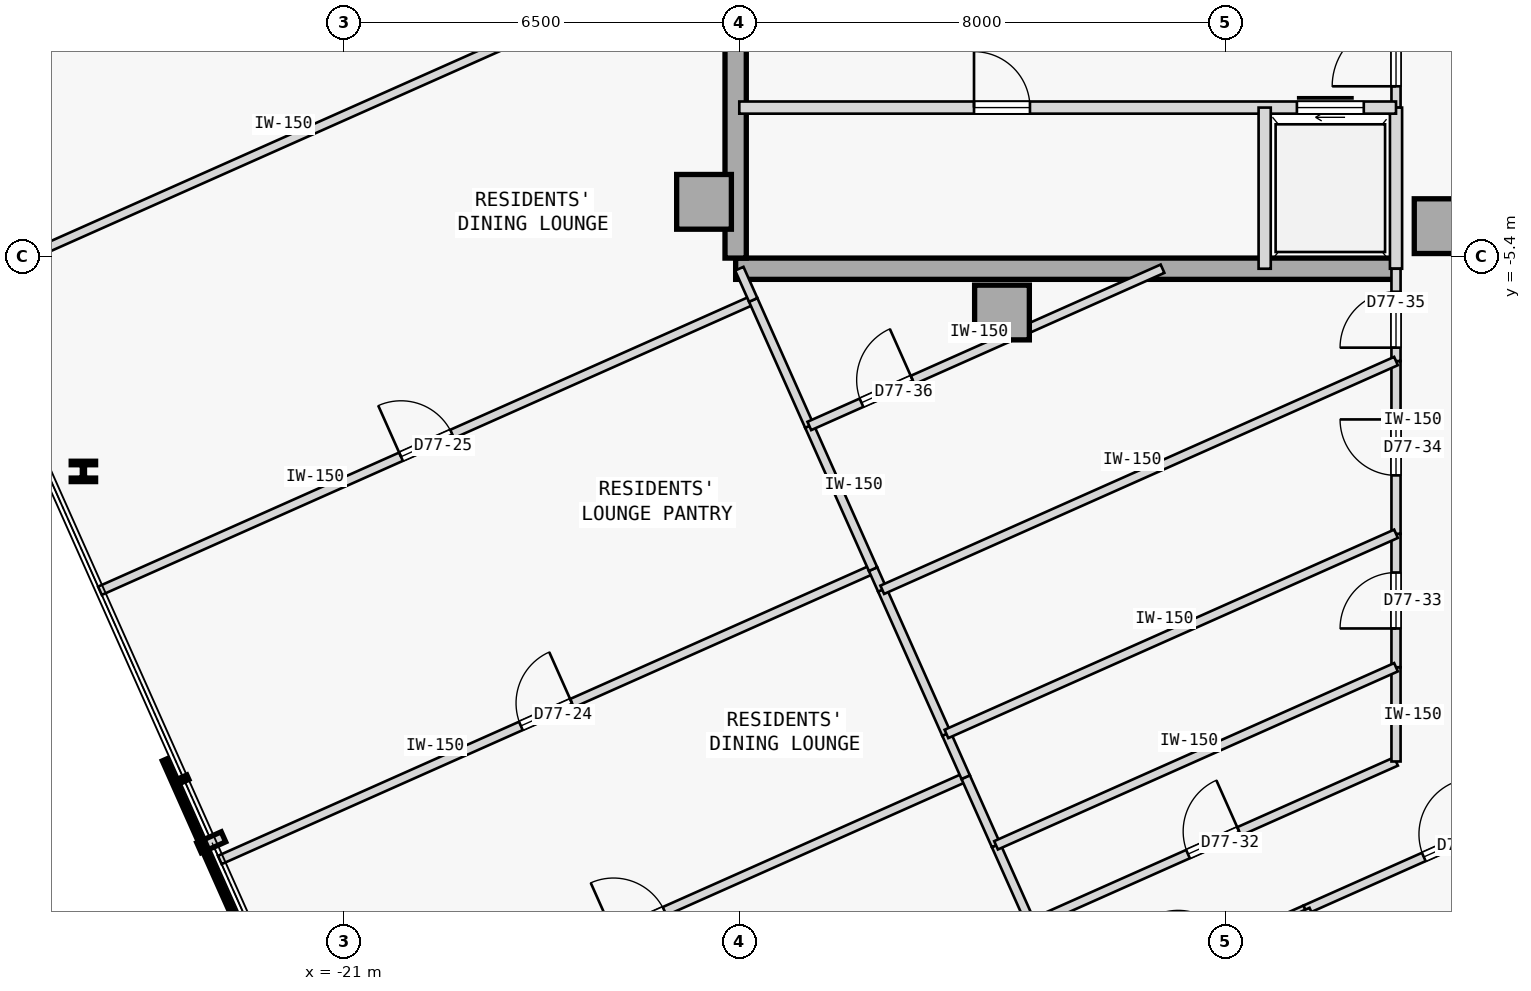
"""IFC4 building model, lengths in metres.
Left out: names, types, materials, properties, quantities, classifications, styles, units other than length and angle.
Written with IfcOpenShell. Run it as: python <this file> out.ifc"""

import sys

from ifc_helpers import new_model, si_unit, direction, frame, frame_2d, origin, origin_2d, place, context, subcontext, project, spatial, rectangle, i_section, extrude, element, fill, save


model = new_model("IFC4")
c1 = context("Model", 3, precision=1e-05, world=origin(), true_north=direction((0.0, 1.0)))
c2 = subcontext(c1, "Body", "Model", "MODEL_VIEW")
j1 = project(units=[si_unit("LENGTHUNIT", "METRE"), si_unit("PLANEANGLEUNIT", "RADIAN")], contexts=[c1])
p1 = place(None, origin())
s1 = spatial("IfcSite", under=j1, at=p1, CompositionType="ELEMENT")
p2 = place(p1, origin())
s2 = spatial("IfcBuilding", under=s1, at=p2, CompositionType="ELEMENT")
p3 = place(p2, frame((0.0, 0.0, 288.6)))
s3 = spatial("IfcBuildingStorey", under=s2, at=p3, CompositionType="ELEMENT", Elevation=288.6)
for number, where, z_axis, x_axis in (
    (1, (-15.08, -4.5, 0.0), (0.0, 0.0, 1.0), (1.0, 0.0, 0.0)),
    (2, (-10.18, -6.32, 0.0), (0.0, 0.0, 1.0), (1.0, 0.0, 0.0)),
    (3, (-2.95, -4.9, 0.0), (0.0, 0.0, 1.0), (1.0, 0.0, 0.0)),
):
    element("IfcColumn", number, at=place(p3, frame(where, z_axis=z_axis, x_axis=x_axis)), inside=s3, PredefinedType="COLUMN", context=c2, shape_type="SweptSolid", body=[
        extrude(rectangle(XDim=0.9, YDim=0.9, at=origin_2d()), origin(), (0.0, 0.0, 1.0), 3.35),
    ])
p4 = place(p3, frame((-14.56, -5.6, 0.0), z_axis=(0.0, 0.0, 1.0), x_axis=(1.0, 0.0, 0.0)))
e4 = element("IfcWall", 4, at=p4, inside=s3, PredefinedType="SHEAR", context=c2, shape_type="SweptSolid", body=[
    extrude(rectangle(XDim=10.86, YDim=0.35, at=frame_2d((5.43, 0.0))), origin(), (0.0, 0.0, 1.0), 3.125),
])
p5 = place(p3, frame((-14.56, -5.425, 0.0), z_axis=(0.0, 0.0, 1.0), x_axis=(0.0, 1.0, 0.0)))
e5 = element("IfcWall", 5, at=p5, inside=s3, PredefinedType="SHEAR", context=c2, shape_type="SweptSolid", body=[
    extrude(rectangle(XDim=10.85, YDim=0.35, at=frame_2d((5.425, 0.0))), origin(), (0.0, 0.0, 1.0), 3.125),
])
p6 = place(p3, frame((-25.286, -8.933, 0.0), z_axis=(0.0, 0.0, 1.0), x_axis=(1.0, 0.0, 0.0)))
e6 = element("IfcColumn", 6, at=p6, inside=s3, PredefinedType="COLUMN", context=c2, shape_type="SweptSolid", body=[
    extrude(i_section(OverallWidth=0.401, OverallDepth=0.335, WebThickness=0.036, FlangeThickness=0.058, FilletRadius=0.015, at=origin_2d()), origin(), (0.0, 0.0, 1.0), 3.35),
])
p7 = place(p3, frame((-3.7, -2.95, 0.0), z_axis=(0.0, 0.0, 1.0), x_axis=(0.0, 1.0, 0.0)))
e7 = element("IfcWall", 7, at=p7, inside=s3, PredefinedType="PARTITIONING", context=c2, shape_type="SweptSolid", body=[
    extrude(rectangle(XDim=1.8, YDim=0.15, at=frame_2d((0.9, 0.0))), origin(), (0.0, 0.0, 1.0), 3.125),
])
p8 = place(p7, frame((0.35, 0.0, 0.0)))
e8 = element("IfcOpeningElement", 8, at=p8, cuts=e7, PredefinedType="OPENING", context=c2, shape_type="SweptSolid", body=[
    extrude(rectangle(XDim=1.05, YDim=2.18, at=frame_2d((0.525, 1.09))), frame((0.0, 0.085, 0.0), z_axis=(0.0, -1.0, 0.0), x_axis=(1.0, 0.0, 0.0)), (0.0, 0.0, 1.0), 0.17),
])
p9 = place(p3, frame((-3.7, -5.6, 0.0), z_axis=(0.0, 0.0, 1.0), x_axis=(0.0, 1.0, 0.0)))
e9 = element("IfcWall", 9, at=p9, inside=s3, PredefinedType="STANDARD", context=c2, shape_type="SweptSolid", body=[
    extrude(rectangle(XDim=2.65, YDim=0.2, at=frame_2d((1.325, 0.0))), origin(), (0.0, 0.0, 1.0), 3.125),
])
p10 = place(p3, frame((-14.5, -2.95, 0.0), z_axis=(0.0, 0.0, 1.0), x_axis=(1.0, 0.0, 0.0)))
e10 = element("IfcWall", 10, at=p10, inside=s3, PredefinedType="STANDARD", context=c2, shape_type="SweptSolid", body=[
    extrude(rectangle(XDim=10.8, YDim=0.2, at=frame_2d((5.4, 0.0))), origin(), (0.0, 0.0, 1.0), 3.125),
])
p11 = place(p10, frame((9.17, 0.0, 0.0)))
e11 = element("IfcOpeningElement", 11, at=p11, cuts=e10, PredefinedType="OPENING", context=c2, shape_type="SweptSolid", body=[
    extrude(rectangle(XDim=1.1, YDim=2.15, at=frame_2d((0.55, 1.075))), frame((0.0, 0.11, 0.0), z_axis=(0.0, -1.0, 0.0), x_axis=(1.0, 0.0, 0.0)), (0.0, 0.0, 1.0), 0.22),
])
p12 = place(p10, frame((3.86, 0.0, 0.0)))
e12 = element("IfcOpeningElement", 12, at=p12, cuts=e10, PredefinedType="OPENING", context=c2, shape_type="SweptSolid", body=[
    extrude(rectangle(XDim=0.92, YDim=2.15, at=frame_2d((0.46, 1.075))), frame((0.0, 0.11, 0.0), z_axis=(0.0, -1.0, 0.0), x_axis=(1.0, 0.0, 0.0)), (0.0, 0.0, 1.0), 0.22),
])
p13 = place(p3, frame((-5.86, -5.6, 0.0), z_axis=(0.0, 0.0, 1.0), x_axis=(0.0, 1.0, 0.0)))
e13 = element("IfcWall", 13, at=p13, inside=s3, PredefinedType="STANDARD", context=c2, shape_type="SweptSolid", body=[
    extrude(rectangle(XDim=2.65, YDim=0.2, at=frame_2d((1.325, 0.0))), origin(), (0.0, 0.0, 1.0), 3.125),
])
p14 = place(p3, frame((-8.533, -17.628, 0.0), z_axis=(0.0, 0.0, 1.0), x_axis=(0.913560976273, 0.406701785873, 0.0)))
e14 = element("IfcWall", 14, at=p14, inside=s3, PredefinedType="PARTITIONING", context=c2, shape_type="SweptSolid", body=[
    extrude(rectangle(XDim=3.659, YDim=0.15, at=frame_2d((1.829, 0.0))), origin(), (0.0, 0.0, 1.0), 3.125),
])
p15 = place(p14, frame((1.369, 0.0, 0.0)))
e15 = element("IfcOpeningElement", 15, at=p15, cuts=e14, PredefinedType="OPENING", context=c2, shape_type="SweptSolid", body=[
    extrude(rectangle(XDim=0.92, YDim=2.15, at=frame_2d((0.46, 1.075))), frame((0.0, 0.085, 0.0), z_axis=(0.0, -1.0, 0.0), x_axis=(1.0, 0.0, 0.0)), (0.0, 0.0, 1.0), 0.17),
])
p16 = place(p3, frame((-5.191, -16.14, 0.0), z_axis=(0.0, 0.0, 1.0), x_axis=(0.913541346619, 0.40674587646, 0.0)))
e16 = element("IfcWall", 16, at=p16, inside=s3, PredefinedType="PARTITIONING", context=c2, shape_type="SweptSolid", body=[
    extrude(rectangle(XDim=5.183, YDim=0.15, at=frame_2d((2.591, 0.0))), origin(), (0.0, 0.0, 1.0), 3.125),
])
p17 = place(p16, frame((2.132, 0.0, 0.0)))
e17 = element("IfcOpeningElement", 17, at=p17, cuts=e16, PredefinedType="OPENING", context=c2, shape_type="SweptSolid", body=[
    extrude(rectangle(XDim=0.92, YDim=2.15, at=frame_2d((0.46, 1.075))), frame((0.0, 0.085, 0.0), z_axis=(0.0, -1.0, 0.0), x_axis=(1.0, 0.0, 0.0)), (0.0, 0.0, 1.0), 0.17),
])
p18 = place(p3, frame((-9.702, -16.375, 0.0), z_axis=(0.0, 0.0, 1.0), x_axis=(0.913552389019, 0.406721074594, 0.0)))
e18 = element("IfcWall", 18, at=p18, inside=s3, PredefinedType="PARTITIONING", context=c2, shape_type="SweptSolid", body=[
    extrude(rectangle(XDim=6.57, YDim=0.15, at=frame_2d((3.285, 0.0))), origin(), (0.0, 0.0, 1.0), 3.125),
])
p19 = place(p18, frame((2.825, 0.0, 0.0)))
e19 = element("IfcOpeningElement", 19, at=p19, cuts=e18, PredefinedType="OPENING", context=c2, shape_type="SweptSolid", body=[
    extrude(rectangle(XDim=0.92, YDim=2.15, at=frame_2d((0.46, 1.075))), frame((0.0, 0.085, 0.0), z_axis=(0.0, -1.0, 0.0), x_axis=(1.0, 0.0, 0.0)), (0.0, 0.0, 1.0), 0.17),
])
p20 = place(p3, frame((-3.7, -13.703, 0.0), z_axis=(0.0, 0.0, 1.0), x_axis=(-0.000157529929, 0.999999987592, 0.0)))
e20 = element("IfcWall", 20, at=p20, inside=s3, PredefinedType="PARTITIONING", context=c2, shape_type="SweptSolid", body=[
    extrude(rectangle(XDim=1.55, YDim=0.15, at=frame_2d((0.775, 0.0))), origin(), (0.0, 0.0, 1.0), 3.125),
])
p21 = place(p3, frame((-3.7, -12.154, 0.0), z_axis=(0.0, 0.0, 1.0), x_axis=(0.000111222333, 0.999999993815, 0.0)))
e21 = element("IfcWall", 21, at=p21, inside=s3, PredefinedType="PARTITIONING", context=c2, shape_type="SweptSolid", body=[
    extrude(rectangle(XDim=2.195, YDim=0.15, at=frame_2d((1.098, 0.0))), origin(), (0.0, 0.0, 1.0), 3.125),
])
p22 = place(p21, frame((0.637, 0.0, 0.0)))
e22 = element("IfcOpeningElement", 22, at=p22, cuts=e21, PredefinedType="OPENING", context=c2, shape_type="SweptSolid", body=[
    extrude(rectangle(XDim=0.92, YDim=2.15, at=frame_2d((0.46, 1.075))), frame((0.0, 0.085, 0.0), z_axis=(0.0, -1.0, 0.0), x_axis=(1.0, 0.0, 0.0)), (0.0, 0.0, 1.0), 0.17),
])
p23 = place(p3, frame((-3.7, -9.958, 0.0), z_axis=(0.0, 0.0, 1.0), x_axis=(-0.000171909917, 0.999999985223, 0.0)))
e23 = element("IfcWall", 23, at=p23, inside=s3, PredefinedType="PARTITIONING", context=c2, shape_type="SweptSolid", body=[
    extrude(rectangle(XDim=2.84, YDim=0.15, at=frame_2d((1.42, 0.0))), origin(), (0.0, 0.0, 1.0), 3.125),
])
p24 = place(p23, frame((0.96, 0.0, 0.0)))
e24 = element("IfcOpeningElement", 24, at=p24, cuts=e23, PredefinedType="OPENING", context=c2, shape_type="SweptSolid", body=[
    extrude(rectangle(XDim=0.92, YDim=2.15, at=frame_2d((0.46, 1.075))), frame((0.0, 0.085, 0.0), z_axis=(0.0, -1.0, 0.0), x_axis=(1.0, 0.0, 0.0)), (0.0, 0.0, 1.0), 0.17),
])
p25 = place(p3, frame((-3.7, -7.118, 0.0), z_axis=(0.0, 0.0, 1.0), x_axis=(0.000321543392, 0.999999948305, 0.0)))
e25 = element("IfcWall", 25, at=p25, inside=s3, PredefinedType="PARTITIONING", context=c2, shape_type="SweptSolid", body=[
    extrude(rectangle(XDim=1.519, YDim=0.15, at=frame_2d((0.759, 0.0))), origin(), (0.0, 0.0, 1.0), 3.125),
])
p26 = place(p25, frame((0.22, 0.0, 0.0)))
e26 = element("IfcOpeningElement", 26, at=p26, cuts=e25, PredefinedType="OPENING", context=c2, shape_type="SweptSolid", body=[
    extrude(rectangle(XDim=0.92, YDim=2.15, at=frame_2d((0.46, 1.075))), frame((0.0, 0.085, 0.0), z_axis=(0.0, -1.0, 0.0), x_axis=(1.0, 0.0, 0.0)), (0.0, 0.0, 1.0), 0.17),
])
p27 = place(p3, frame((-21.52, -18.744, 0.0), z_axis=(0.0, 0.0, 1.0), x_axis=(0.913539967617, 0.406748973651, 0.0)))
e27 = element("IfcWall", 27, at=p27, inside=s3, PredefinedType="PARTITIONING", context=c2, shape_type="SweptSolid", body=[
    extrude(rectangle(XDim=11.76, YDim=0.15, at=frame_2d((5.88, 0.0))), origin(), (0.0, 0.0, 1.0), 3.125),
])
p28 = place(p27, frame((5.42, 0.0, 0.0)))
e28 = element("IfcOpeningElement", 28, at=p28, cuts=e27, PredefinedType="OPENING", context=c2, shape_type="SweptSolid", body=[
    extrude(rectangle(XDim=0.92, YDim=2.15, at=frame_2d((0.46, 1.075))), frame((0.0, 0.085, 0.0), z_axis=(0.0, -1.0, 0.0), x_axis=(1.0, 0.0, 0.0)), (0.0, 0.0, 1.0), 0.17),
])
p29 = place(p3, frame((-9.702, -16.375, 0.0), z_axis=(0.0, 0.0, 1.0), x_axis=(-0.406762319034, 0.913534025537, 0.0)))
e29 = element("IfcWall", 29, at=p29, inside=s3, PredefinedType="PARTITIONING", context=c2, shape_type="SweptSolid", body=[
    extrude(rectangle(XDim=1.416, YDim=0.15, at=frame_2d((0.708, 0.0))), origin(), (0.0, 0.0, 1.0), 3.125),
])
p30 = place(p3, frame((-10.278, -15.082, 0.0), z_axis=(0.0, 0.0, 1.0), x_axis=(-0.406655262741, 0.913581686159, 0.0)))
e30 = element("IfcWall", 30, at=p30, inside=s3, PredefinedType="PARTITIONING", context=c2, shape_type="SweptSolid", body=[
    extrude(rectangle(XDim=1.227, YDim=0.15, at=frame_2d((0.614, 0.0))), origin(), (0.0, 0.0, 1.0), 3.125),
])
p31 = place(p3, frame((-23.043, -15.323, 0.0), z_axis=(0.0, 0.0, 1.0), x_axis=(0.913547681516, 0.406731648137, 0.0)))
e31 = element("IfcWall", 31, at=p31, inside=s3, PredefinedType="PARTITIONING", context=c2, shape_type="SweptSolid", body=[
    extrude(rectangle(XDim=11.76, YDim=0.15, at=frame_2d((5.88, 0.0))), origin(), (0.0, 0.0, 1.0), 3.125),
])
p32 = place(p31, frame((5.42, 0.0, 0.0)))
e32 = element("IfcOpeningElement", 32, at=p32, cuts=e31, PredefinedType="OPENING", context=c2, shape_type="SweptSolid", body=[
    extrude(rectangle(XDim=0.92, YDim=2.15, at=frame_2d((0.46, 1.075))), frame((0.0, 0.085, 0.0), z_axis=(0.0, -1.0, 0.0), x_axis=(1.0, 0.0, 0.0)), (0.0, 0.0, 1.0), 0.17),
])
p33 = place(p3, frame((-10.777, -13.961, 0.0), z_axis=(0.0, 0.0, 1.0), x_axis=(-0.406720744325, 0.913552536057, 0.0)))
e33 = element("IfcWall", 33, at=p33, inside=s3, PredefinedType="PARTITIONING", context=c2, shape_type="SweptSolid", body=[
    extrude(rectangle(XDim=0.778, YDim=0.15, at=frame_2d((0.389, 0.0))), origin(), (0.0, 0.0, 1.0), 3.125),
])
p34 = place(p3, frame((-11.093, -13.25, 0.0), z_axis=(0.0, 0.0, 1.0), x_axis=(-0.406723252866, 0.91355141923, 0.0)))
e34 = element("IfcWall", 34, at=p34, inside=s3, PredefinedType="PARTITIONING", context=c2, shape_type="SweptSolid", body=[
    extrude(rectangle(XDim=2.595, YDim=0.15, at=frame_2d((1.297, 0.0))), origin(), (0.0, 0.0, 1.0), 3.125),
])
p35 = place(p3, frame((-12.149, -10.88, 0.0), z_axis=(0.0, 0.0, 1.0), x_axis=(-0.406868995548, 0.913486519037, 0.0)))
e35 = element("IfcWall", 35, at=p35, inside=s3, PredefinedType="PARTITIONING", context=c2, shape_type="SweptSolid", body=[
    extrude(rectangle(XDim=0.372, YDim=0.15, at=frame_2d((0.186, 0.0))), origin(), (0.0, 0.0, 1.0), 3.125),
])
p36 = place(p3, frame((-25.014, -10.896, 0.0), z_axis=(0.0, 0.0, 1.0), x_axis=(0.913544247064, 0.406739362069, 0.0)))
e36 = element("IfcWall", 36, at=p36, inside=s3, PredefinedType="PARTITIONING", context=c2, shape_type="SweptSolid", body=[
    extrude(rectangle(XDim=11.76, YDim=0.15, at=frame_2d((5.88, 0.0))), origin(), (0.0, 0.0, 1.0), 3.125),
])
p37 = place(p36, frame((5.42, 0.0, 0.0)))
e37 = element("IfcOpeningElement", 37, at=p37, cuts=e36, PredefinedType="OPENING", context=c2, shape_type="SweptSolid", body=[
    extrude(rectangle(XDim=0.92, YDim=2.15, at=frame_2d((0.46, 1.075))), frame((0.0, 0.085, 0.0), z_axis=(0.0, -1.0, 0.0), x_axis=(1.0, 0.0, 0.0)), (0.0, 0.0, 1.0), 0.17),
])
p38 = place(p3, frame((-12.3, -10.54, 0.0), z_axis=(0.0, 0.0, 1.0), x_axis=(-0.406788806475, 0.913522231216, 0.0)))
e38 = element("IfcWall", 38, at=p38, inside=s3, PredefinedType="PARTITIONING", context=c2, shape_type="SweptSolid", body=[
    extrude(rectangle(XDim=2.577, YDim=0.15, at=frame_2d((1.289, 0.0))), origin(), (0.0, 0.0, 1.0), 3.125),
])
p39 = place(p3, frame((-13.348, -8.186, 0.0), z_axis=(0.0, 0.0, 1.0), x_axis=(-0.40673740295, 0.913545119324, 0.0)))
e39 = element("IfcWall", 39, at=p39, inside=s3, PredefinedType="PARTITIONING", context=c2, shape_type="SweptSolid", body=[
    extrude(rectangle(XDim=2.269, YDim=0.15, at=frame_2d((1.134, 0.0))), origin(), (0.0, 0.0, 1.0), 3.125),
])
p40 = place(p3, frame((-27.254, -5.865, 0.0), z_axis=(0.0, 0.0, 1.0), x_axis=(0.913547681516, 0.406731648137, 0.0)))
e40 = element("IfcWall", 40, at=p40, inside=s3, PredefinedType="PARTITIONING", context=c2, shape_type="SweptSolid", body=[
    extrude(rectangle(XDim=11.76, YDim=0.15, at=frame_2d((5.88, 0.0))), origin(), (0.0, 0.0, 1.0), 3.125),
])
p41 = place(p3, frame((-14.271, -6.113, 0.0), z_axis=(0.0, 0.0, 1.0), x_axis=(-0.406622099206, 0.913596447255, 0.0)))
e41 = element("IfcWall", 41, at=p41, inside=s3, PredefinedType="PARTITIONING", context=c2, shape_type="SweptSolid", body=[
    extrude(rectangle(XDim=0.562, YDim=0.15, at=frame_2d((0.281, 0.0))), origin(), (0.0, 0.0, 1.0), 3.125),
])
p42 = place(p3, frame((-1.312, -24.851, 0.0), z_axis=(0.0, 0.0, 1.0), x_axis=(-0.406760810574, 0.913534697196, 0.0)))
e42 = element("IfcWall", 42, at=p42, inside=s3, PredefinedType="PARTITIONING", context=c2, shape_type="SweptSolid", body=[
    extrude(rectangle(XDim=9.535, YDim=0.15, at=frame_2d((4.768, 0.0))), origin(), (0.0, 0.0, 1.0), 3.125),
])
p43 = place(p3, frame((-10.278, -15.082, 0.0), z_axis=(0.0, 0.0, 1.0), x_axis=(0.913549882956, 0.406726703513, 0.0)))
e43 = element("IfcWall", 43, at=p43, inside=s3, PredefinedType="PARTITIONING", context=c2, shape_type="SweptSolid", body=[
    extrude(rectangle(XDim=7.2, YDim=0.15, at=frame_2d((3.6, 0.0))), origin(), (0.0, 0.0, 1.0), 3.125),
])
p44 = place(p3, frame((-11.093, -13.25, 0.0), z_axis=(0.0, 0.0, 1.0), x_axis=(0.913543891457, 0.406740160767, 0.0)))
e44 = element("IfcWall", 44, at=p44, inside=s3, PredefinedType="PARTITIONING", context=c2, shape_type="SweptSolid", body=[
    extrude(rectangle(XDim=8.093, YDim=0.15, at=frame_2d((4.046, 0.0))), origin(), (0.0, 0.0, 1.0), 3.125),
])
p45 = place(p3, frame((-12.149, -10.88, 0.0), z_axis=(0.0, 0.0, 1.0), x_axis=(0.913542450291, 0.406743397631, 0.0)))
e45 = element("IfcWall", 45, at=p45, inside=s3, PredefinedType="PARTITIONING", context=c2, shape_type="SweptSolid", body=[
    extrude(rectangle(XDim=9.248, YDim=0.15, at=frame_2d((4.624, 0.0))), origin(), (0.0, 0.0, 1.0), 3.125),
])
p46 = place(p3, frame((-13.348, -8.186, 0.0), z_axis=(0.0, 0.0, 1.0), x_axis=(0.913551673432, 0.406722681896, 0.0)))
e46 = element("IfcWall", 46, at=p46, inside=s3, PredefinedType="PARTITIONING", context=c2, shape_type="SweptSolid", body=[
    extrude(rectangle(XDim=6.358, YDim=0.15, at=frame_2d((3.179, 0.0))), origin(), (0.0, 0.0, 1.0), 3.125),
])
p47 = place(p46, frame((0.939, 0.0, 0.0)))
e47 = element("IfcOpeningElement", 47, at=p47, cuts=e46, PredefinedType="OPENING", context=c2, shape_type="SweptSolid", body=[
    extrude(rectangle(XDim=0.92, YDim=2.15, at=frame_2d((0.46, 1.075))), frame((0.0, 0.085, 0.0), z_axis=(0.0, -1.0, 0.0), x_axis=(1.0, 0.0, 0.0)), (0.0, 0.0, 1.0), 0.17),
])
p48 = place(p8, origin())
e48 = element("IfcDoor", 48, at=p48, inside=s3, OperationType="SINGLE_SWING_LEFT", PredefinedType="DOOR", context=c2, shape_type="SweptSolid", body=[
    extrude(rectangle(XDim=1.05, YDim=2.18, at=frame_2d((0.525, 1.09))), frame((0.0, 0.025, 0.0), z_axis=(0.0, -1.0, 0.0), x_axis=(1.0, 0.0, 0.0)), (0.0, 0.0, 1.0), 0.05),
])
fill(e8, e48)
p49 = place(p11, origin())
e49 = element("IfcDoor", 49, at=p49, inside=s3, OperationType="SLIDING_TO_RIGHT", PredefinedType="DOOR", context=c2, shape_type="SweptSolid", body=[
    extrude(rectangle(XDim=1.1, YDim=2.15, at=frame_2d((0.55, 1.075))), frame((0.0, 0.025, 0.0), z_axis=(0.0, -1.0, 0.0), x_axis=(1.0, 0.0, 0.0)), (0.0, 0.0, 1.0), 0.05),
])
fill(e11, e49)
p50 = place(p12, origin())
e50 = element("IfcDoor", 50, at=p50, inside=s3, OperationType="SINGLE_SWING_LEFT", PredefinedType="DOOR", context=c2, shape_type="SweptSolid", body=[
    extrude(rectangle(XDim=0.92, YDim=2.15, at=frame_2d((0.46, 1.075))), frame((0.0, 0.025, 0.0), z_axis=(0.0, -1.0, 0.0), x_axis=(1.0, 0.0, 0.0)), (0.0, 0.0, 1.0), 0.05),
])
fill(e12, e50)
p51 = place(p28, origin())
e51 = element("IfcDoor", 51, at=p51, inside=s3, OperationType="SINGLE_SWING_LEFT", PredefinedType="DOOR", context=c2, shape_type="SweptSolid", body=[
    extrude(rectangle(XDim=0.92, YDim=2.15, at=frame_2d((0.46, 1.075))), frame((0.0, 0.025, 0.0), z_axis=(0.0, -1.0, 0.0), x_axis=(1.0, 0.0, 0.0)), (0.0, 0.0, 1.0), 0.05),
])
fill(e28, e51)
p52 = place(p32, origin())
e52 = element("IfcDoor", 52, at=p52, inside=s3, OperationType="SINGLE_SWING_RIGHT", PredefinedType="DOOR", context=c2, shape_type="SweptSolid", body=[
    extrude(rectangle(XDim=0.92, YDim=2.15, at=frame_2d((0.46, 1.075))), frame((0.0, 0.025, 0.0), z_axis=(0.0, -1.0, 0.0), x_axis=(1.0, 0.0, 0.0)), (0.0, 0.0, 1.0), 0.05),
])
fill(e32, e52)
p53 = place(p37, origin())
e53 = element("IfcDoor", 53, at=p53, inside=s3, OperationType="SINGLE_SWING_LEFT", PredefinedType="DOOR", context=c2, shape_type="SweptSolid", body=[
    extrude(rectangle(XDim=0.92, YDim=2.15, at=frame_2d((0.46, 1.075))), frame((0.0, 0.025, 0.0), z_axis=(0.0, -1.0, 0.0), x_axis=(1.0, 0.0, 0.0)), (0.0, 0.0, 1.0), 0.05),
])
fill(e37, e53)
p54 = place(p17, origin())
e54 = element("IfcDoor", 54, at=p54, inside=s3, OperationType="SINGLE_SWING_RIGHT", PredefinedType="DOOR", context=c2, shape_type="SweptSolid", body=[
    extrude(rectangle(XDim=0.92, YDim=2.15, at=frame_2d((0.46, 1.075))), frame((0.0, 0.025, 0.0), z_axis=(0.0, -1.0, 0.0), x_axis=(1.0, 0.0, 0.0)), (0.0, 0.0, 1.0), 0.05),
])
fill(e17, e54)
p55 = place(p19, origin())
e55 = element("IfcDoor", 55, at=p55, inside=s3, OperationType="SINGLE_SWING_RIGHT", PredefinedType="DOOR", context=c2, shape_type="SweptSolid", body=[
    extrude(rectangle(XDim=0.92, YDim=2.15, at=frame_2d((0.46, 1.075))), frame((0.0, 0.025, 0.0), z_axis=(0.0, -1.0, 0.0), x_axis=(1.0, 0.0, 0.0)), (0.0, 0.0, 1.0), 0.05),
])
fill(e19, e55)
p56 = place(p22, origin())
e56 = element("IfcDoor", 56, at=p56, inside=s3, OperationType="SINGLE_SWING_LEFT", PredefinedType="DOOR", context=c2, shape_type="SweptSolid", body=[
    extrude(rectangle(XDim=0.92, YDim=2.15, at=frame_2d((0.46, 1.075))), frame((0.0, 0.025, 0.0), z_axis=(0.0, -1.0, 0.0), x_axis=(1.0, 0.0, 0.0)), (0.0, 0.0, 1.0), 0.05),
])
fill(e22, e56)
p57 = place(p24, origin())
e57 = element("IfcDoor", 57, at=p57, inside=s3, OperationType="SINGLE_SWING_RIGHT", PredefinedType="DOOR", context=c2, shape_type="SweptSolid", body=[
    extrude(rectangle(XDim=0.92, YDim=2.15, at=frame_2d((0.46, 1.075))), frame((0.0, 0.025, 0.0), z_axis=(0.0, -1.0, 0.0), x_axis=(1.0, 0.0, 0.0)), (0.0, 0.0, 1.0), 0.05),
])
fill(e24, e57)
p58 = place(p26, origin())
e58 = element("IfcDoor", 58, at=p58, inside=s3, OperationType="SINGLE_SWING_LEFT", PredefinedType="DOOR", context=c2, shape_type="SweptSolid", body=[
    extrude(rectangle(XDim=0.92, YDim=2.15, at=frame_2d((0.46, 1.075))), frame((0.0, 0.025, 0.0), z_axis=(0.0, -1.0, 0.0), x_axis=(1.0, 0.0, 0.0)), (0.0, 0.0, 1.0), 0.05),
])
fill(e26, e58)
p59 = place(p47, origin())
e59 = element("IfcDoor", 59, at=p59, inside=s3, OperationType="SINGLE_SWING_RIGHT", PredefinedType="DOOR", context=c2, shape_type="SweptSolid", body=[
    extrude(rectangle(XDim=0.92, YDim=2.15, at=frame_2d((0.46, 1.075))), frame((0.0, 0.025, 0.0), z_axis=(0.0, -1.0, 0.0), x_axis=(1.0, 0.0, 0.0)), (0.0, 0.0, 1.0), 0.05),
])
fill(e47, e59)
save(model, sys.argv[1])
